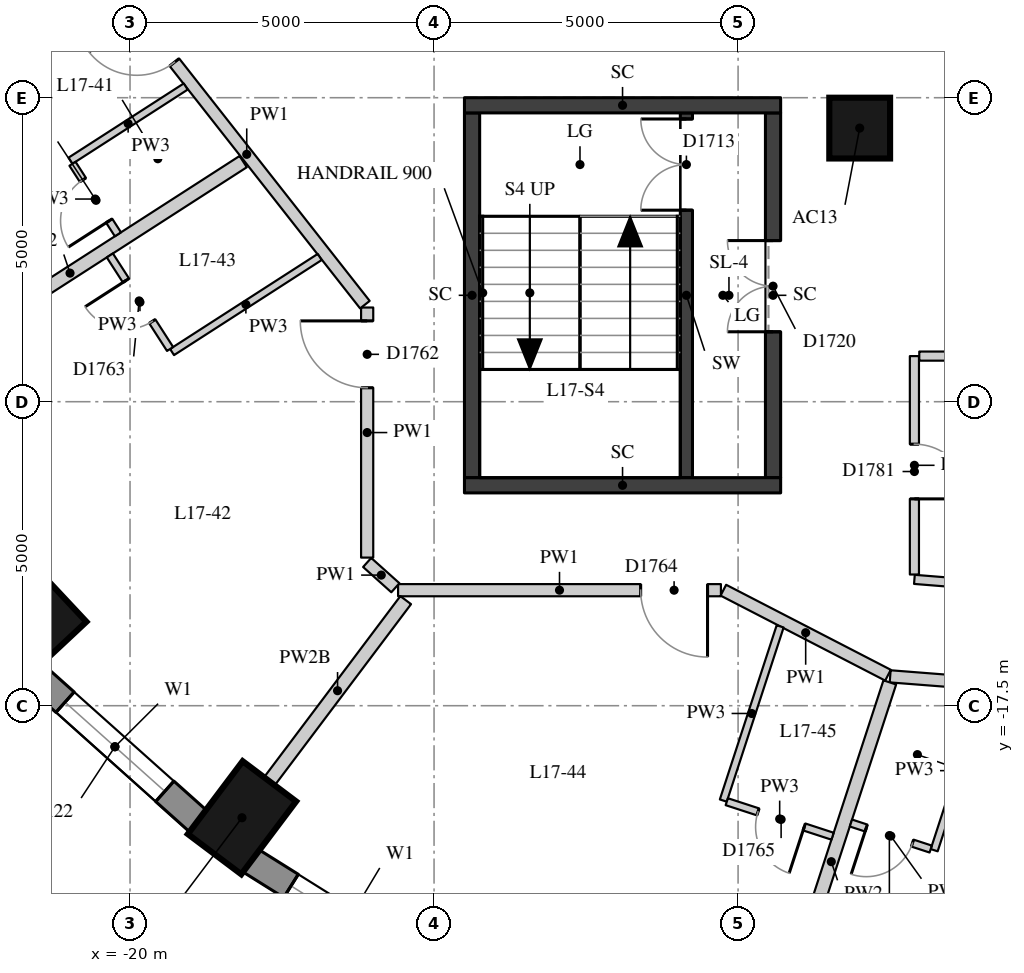
"""IFC4 building model, lengths in metres.
Left out: names, types, materials, properties, quantities, classifications, styles, units other than length and angle.
Written with IfcOpenShell. Run it as: python <this file> out.ifc"""

import sys

from ifc_helpers import new_model, si_unit, direction, frame, frame_2d, origin, origin_2d, place, context, subcontext, project, spatial, rectangle, extrude, element, fill, save


model = new_model("IFC4")
c1 = context("Model", 3, precision=1e-05, world=origin(), true_north=direction((0.0, 1.0)))
c2 = subcontext(c1, "Body", "Model", "MODEL_VIEW")
j1 = project(units=[si_unit("LENGTHUNIT", "METRE"), si_unit("PLANEANGLEUNIT", "RADIAN")], contexts=[c1])
p1 = place(None, origin())
s1 = spatial("IfcSite", under=j1, at=p1, CompositionType="ELEMENT")
p2 = place(p1, origin())
s2 = spatial("IfcBuilding", under=s1, at=p2, CompositionType="ELEMENT")
p3 = place(p2, frame((0.0, 0.0, 64.6)))
s3 = spatial("IfcBuildingStorey", under=s2, at=p3, CompositionType="ELEMENT", Elevation=64.6)
for number, where, z_axis, x_axis in (
    (1, (-21.641, -16.23, 0.0), (0.0, 0.0, 1.0), (-0.73, -0.683, 0.0)),
    (2, (-18.159, -19.343, 0.0), (0.0, 0.0, 1.0), (-0.601, -0.799, 0.0)),
):
    element("IfcColumn", number, at=place(p3, frame(where, z_axis=z_axis, x_axis=x_axis)), inside=s3, PredefinedType="COLUMN", context=c2, shape_type="SweptSolid", body=[
        extrude(rectangle(XDim=1.5, YDim=1.1, at=origin_2d()), origin(), (0.0, 0.0, 1.0), 3.3),
    ])
p4 = place(p3, frame((-8.0, -8.0, 0.0), z_axis=(0.0, 0.0, 1.0), x_axis=(1.0, 0.0, 0.0)))
e3 = element("IfcColumn", 3, at=p4, inside=s3, PredefinedType="COLUMN", context=c2, shape_type="SweptSolid", body=[
    extrude(rectangle(XDim=1.0, YDim=1.0, at=origin_2d()), origin(), (0.0, 0.0, 1.0), 3.3),
])
p5 = place(p3, frame((-21.627, -16.943, 0.0), z_axis=(0.0, 0.0, 1.0), x_axis=(0.745526233716, -0.66647628228, 0.0)))
e4 = element("IfcWall", 4, at=p5, inside=s3, PredefinedType="SOLIDWALL", context=c2, shape_type="SweptSolid", body=[
    extrude(rectangle(XDim=3.697, YDim=0.45, at=frame_2d((1.848, 0.0))), origin(), (0.0, 0.0, 1.0), 3.02),
])
p6 = place(p5, frame((0.749, 0.0, 0.4)))
e5 = element("IfcOpeningElement", 5, at=p6, cuts=e4, PredefinedType="OPENING", context=c2, shape_type="SweptSolid", body=[
    extrude(rectangle(XDim=2.2, YDim=1.75, at=frame_2d((1.1, 0.875))), frame((0.0, 0.235, 0.0), z_axis=(0.0, -1.0, 0.0), x_axis=(1.0, 0.0, 0.0)), (0.0, 0.0, 1.0), 0.47),
])
p7 = place(p3, frame((-18.023, -20.044, 0.0), z_axis=(0.0, 0.0, 1.0), x_axis=(0.847635480093, -0.530579016629, 0.0)))
e6 = element("IfcWall", 6, at=p7, inside=s3, PredefinedType="SOLIDWALL", context=c2, shape_type="SweptSolid", body=[
    extrude(rectangle(XDim=3.782, YDim=0.45, at=frame_2d((1.891, 0.0))), origin(), (0.0, 0.0, 1.0), 3.02),
])
p8 = place(p7, frame((0.791, 0.0, 0.4)))
e7 = element("IfcOpeningElement", 7, at=p8, cuts=e6, PredefinedType="OPENING", context=c2, shape_type="SweptSolid", body=[
    extrude(rectangle(XDim=2.2, YDim=1.75, at=frame_2d((1.1, 0.875))), frame((0.0, 0.235, 0.0), z_axis=(0.0, -1.0, 0.0), x_axis=(1.0, 0.0, 0.0)), (0.0, 0.0, 1.0), 0.47),
])
p9 = place(p3, frame((-10.85, -13.75, 0.0), z_axis=(0.0, 0.0, 1.0), x_axis=(0.0, 1.0, 0.0)))
e8 = element("IfcWall", 8, at=p9, inside=s3, PredefinedType="SHEAR", context=c2, shape_type="SweptSolid", body=[
    extrude(rectangle(XDim=6.0, YDim=0.2, at=frame_2d((3.0, 0.0))), origin(), (0.0, 0.0, 1.0), 3.02),
])
p10 = place(p9, frame((4.4, 0.0, 0.0)))
e9 = element("IfcOpeningElement", 9, at=p10, cuts=e8, PredefinedType="OPENING", context=c2, shape_type="SweptSolid", body=[
    extrude(rectangle(XDim=1.5, YDim=2.1, at=frame_2d((0.75, 1.05))), frame((0.0, 0.11, 0.0), z_axis=(0.0, -1.0, 0.0), x_axis=(1.0, 0.0, 0.0)), (0.0, 0.0, 1.0), 0.22),
])
p11 = place(p3, frame((-14.375, -13.75, -0.28), z_axis=(0.0, 0.0, 1.0), x_axis=(0.0, 1.0, 0.0)))
e10 = element("IfcWall", 10, at=p11, inside=s3, PredefinedType="SHEAR", context=c2, shape_type="SweptSolid", body=[
    extrude(rectangle(XDim=6.0, YDim=0.25, at=frame_2d((3.0, 0.0))), origin(), (0.0, 0.0, 1.0), 3.3),
])
p12 = place(p3, frame((-9.425, -13.75, -0.28), z_axis=(0.0, 0.0, 1.0), x_axis=(0.0, 1.0, 0.0)))
e11 = element("IfcWall", 11, at=p12, inside=s3, PredefinedType="SHEAR", context=c2, shape_type="SweptSolid", body=[
    extrude(rectangle(XDim=6.0, YDim=0.25, at=frame_2d((3.0, 0.0))), origin(), (0.0, 0.0, 1.0), 3.3),
])
p13 = place(p12, frame((2.4, 0.0, 0.28)))
e12 = element("IfcOpeningElement", 12, at=p13, cuts=e11, PredefinedType="OPENING", context=c2, shape_type="SweptSolid", body=[
    extrude(rectangle(XDim=1.5, YDim=2.1, at=frame_2d((0.75, 1.05))), frame((0.0, 0.135, 0.0), z_axis=(0.0, -1.0, 0.0), x_axis=(1.0, 0.0, 0.0)), (0.0, 0.0, 1.0), 0.27),
])
for number, where, z_axis, x_axis in (
    (13, (-14.5, -7.625, -0.28), (0.0, 0.0, 1.0), (1.0, 0.0, 0.0)),
    (14, (-14.5, -13.875, -0.28), (0.0, 0.0, 1.0), (1.0, 0.0, 0.0)),
):
    element("IfcWall", number, at=place(p3, frame(where, z_axis=z_axis, x_axis=x_axis)), inside=s3, PredefinedType="SHEAR", context=c2, shape_type="SweptSolid", body=[
        extrude(rectangle(XDim=5.2, YDim=0.25, at=frame_2d((2.6, 0.0))), origin(), (0.0, 0.0, 1.0), 3.3),
    ])
p14 = place(p3, frame((3.778, -17.898, 0.0), z_axis=(0.0, 0.0, 1.0), x_axis=(-0.996963005503, 0.077876605336, 0.0)))
e15 = element("IfcWall", 15, at=p14, inside=s3, PredefinedType="PARTITIONING", context=c2, shape_type="SweptSolid", body=[
    extrude(rectangle(XDim=11.311, YDim=0.2, at=frame_2d((5.656, 0.0))), origin(), (0.0, 0.0, 1.0), 3.02),
])
p15 = place(p14, frame((8.33, 0.0, 0.0)))
e16 = element("IfcOpeningElement", 16, at=p15, cuts=e15, PredefinedType="OPENING", context=c2, shape_type="SweptSolid", body=[
    extrude(rectangle(XDim=1.0, YDim=2.1, at=frame_2d((0.5, 1.05))), frame((0.0, 0.11, 0.0), z_axis=(0.0, -1.0, 0.0), x_axis=(1.0, 0.0, 0.0)), (0.0, 0.0, 1.0), 0.22),
])
p16 = place(p14, frame((5.77, 0.0, 0.0)))
e17 = element("IfcOpeningElement", 17, at=p16, cuts=e15, PredefinedType="OPENING", context=c2, shape_type="SweptSolid", body=[
    extrude(rectangle(XDim=1.0, YDim=2.1, at=frame_2d((0.5, 1.05))), frame((0.0, 0.11, 0.0), z_axis=(0.0, -1.0, 0.0), x_axis=(1.0, 0.0, 0.0)), (0.0, 0.0, 1.0), 0.22),
])
p17 = place(p14, frame((1.45, 0.0, 0.0)))
e18 = element("IfcOpeningElement", 18, at=p17, cuts=e15, PredefinedType="OPENING", context=c2, shape_type="SweptSolid", body=[
    extrude(rectangle(XDim=0.9, YDim=2.1, at=frame_2d((0.45, 1.05))), frame((0.0, 0.11, 0.0), z_axis=(0.0, -1.0, 0.0), x_axis=(1.0, 0.0, 0.0)), (0.0, 0.0, 1.0), 0.22),
])
p18 = place(p3, frame((-7.534, -16.998, 0.0), z_axis=(0.0, 0.0, 1.0), x_axis=(-0.888535328052, 0.458808206992, 0.0)))
e19 = element("IfcWall", 19, at=p18, inside=s3, PredefinedType="PARTITIONING", context=c2, shape_type="SweptSolid", body=[
    extrude(rectangle(XDim=3.047, YDim=0.2, at=frame_2d((1.524, 0.0))), origin(), (0.0, 0.0, 1.0), 3.02),
])
p19 = place(p3, frame((-10.282, -15.6, 0.0), z_axis=(0.0, 0.0, 1.0), x_axis=(-1.0, 0.0, 0.0)))
e20 = element("IfcWall", 20, at=p19, inside=s3, PredefinedType="PARTITIONING", context=c2, shape_type="SweptSolid", body=[
    extrude(rectangle(XDim=5.309, YDim=0.2, at=frame_2d((2.655, 0.0))), origin(), (0.0, 0.0, 1.0), 3.02),
])
p20 = place(p19, frame((0.22, 0.0, 0.0)))
e21 = element("IfcOpeningElement", 21, at=p20, cuts=e20, PredefinedType="OPENING", context=c2, shape_type="SweptSolid", body=[
    extrude(rectangle(XDim=1.1, YDim=2.1, at=frame_2d((0.55, 1.05))), frame((0.0, 0.11, 0.0), z_axis=(0.0, -1.0, 0.0), x_axis=(1.0, 0.0, 0.0)), (0.0, 0.0, 1.0), 0.22),
])
p21 = place(p3, frame((-15.636, -15.56, 0.0), z_axis=(0.0, 0.0, 1.0), x_axis=(-0.744656758283, 0.667447610187, 0.0)))
e22 = element("IfcWall", 22, at=p21, inside=s3, PredefinedType="PARTITIONING", context=c2, shape_type="SweptSolid", body=[
    extrude(rectangle(XDim=0.623, YDim=0.2, at=frame_2d((0.312, 0.0))), origin(), (0.0, 0.0, 1.0), 3.02),
])
p22 = place(p3, frame((-16.1, -15.064, 0.0), z_axis=(0.0, 0.0, 1.0), x_axis=(0.0, 1.0, 0.0)))
e23 = element("IfcWall", 23, at=p22, inside=s3, PredefinedType="PARTITIONING", context=c2, shape_type="SweptSolid", body=[
    extrude(rectangle(XDim=4.113, YDim=0.2, at=frame_2d((2.057, 0.0))), origin(), (0.0, 0.0, 1.0), 3.02),
])
p23 = place(p22, frame((2.793, 0.0, 0.0)))
e24 = element("IfcOpeningElement", 24, at=p23, cuts=e23, PredefinedType="OPENING", context=c2, shape_type="SweptSolid", body=[
    extrude(rectangle(XDim=1.1, YDim=2.1, at=frame_2d((0.55, 1.05))), frame((0.0, 0.11, 0.0), z_axis=(0.0, -1.0, 0.0), x_axis=(1.0, 0.0, 0.0)), (0.0, 0.0, 1.0), 0.22),
])
p24 = place(p3, frame((-16.137, -10.904, 0.0), z_axis=(0.0, 0.0, 1.0), x_axis=(-0.617888403737, 0.786265807808, 0.0)))
e25 = element("IfcWall", 25, at=p24, inside=s3, PredefinedType="PARTITIONING", context=c2, shape_type="SweptSolid", body=[
    extrude(rectangle(XDim=6.29, YDim=0.2, at=frame_2d((3.145, 0.0))), origin(), (0.0, 0.0, 1.0), 3.02),
])
p25 = place(p24, frame((5.07, 0.0, 0.0)))
e26 = element("IfcOpeningElement", 26, at=p25, cuts=e25, PredefinedType="OPENING", context=c2, shape_type="SweptSolid", body=[
    extrude(rectangle(XDim=1.0, YDim=2.1, at=frame_2d((0.5, 1.05))), frame((0.0, 0.11, 0.0), z_axis=(0.0, -1.0, 0.0), x_axis=(1.0, 0.0, 0.0)), (0.0, 0.0, 1.0), 0.22),
])
p26 = place(p3, frame((1.32, -16.1, 0.0), z_axis=(0.0, 0.0, 1.0), x_axis=(-0.996773882711, 0.080260991426, 0.0)))
e27 = element("IfcWall", 27, at=p26, inside=s3, PredefinedType="PARTITIONING", context=c2, shape_type="SweptSolid", body=[
    extrude(rectangle(XDim=8.447, YDim=0.15, at=frame_2d((4.224, 0.0))), origin(), (0.0, 0.0, 1.0), 3.02),
])
p27 = place(p3, frame((-7.1, -15.342, 0.0), z_axis=(0.0, 0.0, 1.0), x_axis=(0.0, 1.0, 0.0)))
e28 = element("IfcWall", 28, at=p27, inside=s3, PredefinedType="PARTITIONING", context=c2, shape_type="SweptSolid", body=[
    extrude(rectangle(XDim=3.592, YDim=0.15, at=frame_2d((1.796, 0.0))), origin(), (0.0, 0.0, 1.0), 3.02),
])
p28 = place(p27, frame((1.244, 0.0, 0.0)))
e29 = element("IfcOpeningElement", 29, at=p28, cuts=e28, PredefinedType="OPENING", context=c2, shape_type="SweptSolid", body=[
    extrude(rectangle(XDim=0.9, YDim=2.1, at=frame_2d((0.45, 1.05))), frame((0.0, 0.085, 0.0), z_axis=(0.0, -1.0, 0.0), x_axis=(1.0, 0.0, 0.0)), (0.0, 0.0, 1.0), 0.17),
])
p29 = place(p3, frame((-7.02, -11.75, 0.0), z_axis=(0.0, 0.0, 1.0), x_axis=(1.0, 0.0, 0.0)))
e30 = element("IfcWall", 30, at=p29, inside=s3, PredefinedType="PARTITIONING", context=c2, shape_type="SweptSolid", body=[
    extrude(rectangle(XDim=2.52, YDim=0.15, at=frame_2d((1.26, 0.0))), origin(), (0.0, 0.0, 1.0), 3.02),
])
p30 = place(p3, frame((-24.608, -7.82, 0.0), z_axis=(0.0, 0.0, 1.0), x_axis=(0.92655764882, 0.376152792643, 0.0)))
e31 = element("IfcWall", 31, at=p30, inside=s3, PredefinedType="PARTITIONING", context=c2, shape_type="SweptSolid", body=[
    extrude(rectangle(XDim=4.848, YDim=0.22, at=frame_2d((2.424, 0.0))), origin(), (0.0, 0.0, 1.0), 3.02),
])
p31 = place(p3, frame((-23.835, -12.219, 0.0), z_axis=(0.0, 0.0, 1.0), x_axis=(0.840749666863, 0.541424046076, 0.0)))
e32 = element("IfcWall", 32, at=p31, inside=s3, PredefinedType="PARTITIONING", context=c2, shape_type="SweptSolid", body=[
    extrude(rectangle(XDim=6.775, YDim=0.22, at=frame_2d((3.387, 0.0))), origin(), (0.0, 0.0, 1.0), 3.02),
])
p32 = place(p3, frame((-17.708, -18.743, 0.0), z_axis=(0.0, 0.0, 1.0), x_axis=(0.601172757903, 0.799119086967, 0.0)))
e33 = element("IfcWall", 33, at=p32, inside=s3, PredefinedType="PARTITIONING", context=c2, shape_type="SweptSolid", body=[
    extrude(rectangle(XDim=3.729, YDim=0.22, at=frame_2d((1.864, 0.0))), origin(), (0.0, 0.0, 1.0), 2.57),
])
p33 = place(p3, frame((-9.429, -23.014, 0.0), z_axis=(0.0, 0.0, 1.0), x_axis=(0.310235573501, 0.950659712481, 0.0)))
e34 = element("IfcWall", 34, at=p33, inside=s3, PredefinedType="PARTITIONING", context=c2, shape_type="SweptSolid", body=[
    extrude(rectangle(XDim=6.204, YDim=0.22, at=frame_2d((3.102, 0.0))), origin(), (0.0, 0.0, 1.0), 3.02),
])
p34 = place(p3, frame((-19.084, -7.316, 0.0), z_axis=(0.0, 0.0, 1.0), x_axis=(-0.840762836723, -0.54140359473, 0.0)))
e35 = element("IfcWall", 35, at=p34, inside=s3, PredefinedType="PARTITIONING", context=c2, shape_type="SweptSolid", body=[
    extrude(rectangle(XDim=2.253, YDim=0.12, at=frame_2d((1.127, 0.0))), origin(), (0.0, 0.0, 1.0), 3.02),
])
p35 = place(p3, frame((-16.881, -10.12, 0.0), z_axis=(0.0, 0.0, 1.0), x_axis=(-0.840749755927, -0.541423907773, 0.0)))
e36 = element("IfcWall", 36, at=p35, inside=s3, PredefinedType="PARTITIONING", context=c2, shape_type="SweptSolid", body=[
    extrude(rectangle(XDim=2.888, YDim=0.12, at=frame_2d((1.444, 0.0))), origin(), (0.0, 0.0, 1.0), 3.02),
])
p36 = place(p3, frame((-9.308, -16.195, 0.0), z_axis=(0.0, 0.0, 1.0), x_axis=(-0.310170219214, -0.950681037527, 0.0)))
e37 = element("IfcWall", 37, at=p36, inside=s3, PredefinedType="PARTITIONING", context=c2, shape_type="SweptSolid", body=[
    extrude(rectangle(XDim=3.014, YDim=0.12, at=frame_2d((1.507, 0.0))), origin(), (0.0, 0.0, 1.0), 3.02),
])
p37 = place(p3, frame((-5.921, -17.26, 0.0), z_axis=(0.0, 0.0, 1.0), x_axis=(-0.310180943487, -0.950677538547, 0.0)))
e38 = element("IfcWall", 38, at=p37, inside=s3, PredefinedType="PARTITIONING", context=c2, shape_type="SweptSolid", body=[
    extrude(rectangle(XDim=2.752, YDim=0.12, at=frame_2d((1.376, 0.0))), origin(), (0.0, 0.0, 1.0), 3.02),
])
p38 = place(p3, frame((-20.946, -8.587, 0.0), z_axis=(0.0, 0.0, 1.0), x_axis=(0.541526323973, -0.840683793375, 0.0)))
e39 = element("IfcWall", 39, at=p38, inside=s3, PredefinedType="PARTITIONING", context=c2, shape_type="SweptSolid", body=[
    extrude(rectangle(XDim=1.38, YDim=0.12, at=frame_2d((0.69, 0.0))), origin(), (0.0, 0.0, 1.0), 3.02),
])
p39 = place(p38, frame((0.315, 0.0, 0.0)))
e40 = element("IfcOpeningElement", 40, at=p39, cuts=e39, PredefinedType="OPENING", context=c2, shape_type="SweptSolid", body=[
    extrude(rectangle(XDim=0.8, YDim=2.1, at=frame_2d((0.4, 1.05))), frame((0.0, 0.07, 0.0), z_axis=(0.0, -1.0, 0.0), x_axis=(1.0, 0.0, 0.0)), (0.0, 0.0, 1.0), 0.14),
])
p40 = place(p3, frame((-19.341, -11.633, 0.0), z_axis=(0.0, 0.0, 1.0), x_axis=(-0.541391271501, 0.840770772055, 0.0)))
e41 = element("IfcWall", 41, at=p40, inside=s3, PredefinedType="PARTITIONING", context=c2, shape_type="SweptSolid", body=[
    extrude(rectangle(XDim=1.83, YDim=0.12, at=frame_2d((0.915, 0.0))), origin(), (0.0, 0.0, 1.0), 3.02),
])
p41 = place(p40, frame((0.54, 0.0, 0.0)))
e42 = element("IfcOpeningElement", 42, at=p41, cuts=e41, PredefinedType="OPENING", context=c2, shape_type="SweptSolid", body=[
    extrude(rectangle(XDim=0.8, YDim=2.1, at=frame_2d((0.4, 1.05))), frame((0.0, 0.07, 0.0), z_axis=(0.0, -1.0, 0.0), x_axis=(1.0, 0.0, 0.0)), (0.0, 0.0, 1.0), 0.14),
])
p42 = place(p3, frame((-10.186, -19.079, 0.0), z_axis=(0.0, 0.0, 1.0), x_axis=(0.950678536911, -0.31017788357, 0.0)))
e43 = element("IfcWall", 43, at=p42, inside=s3, PredefinedType="PARTITIONING", context=c2, shape_type="SweptSolid", body=[
    extrude(rectangle(XDim=1.83, YDim=0.12, at=frame_2d((0.915, 0.0))), origin(), (0.0, 0.0, 1.0), 3.02),
])
p43 = place(p42, frame((0.54, 0.0, 0.0)))
e44 = element("IfcOpeningElement", 44, at=p43, cuts=e43, PredefinedType="OPENING", context=c2, shape_type="SweptSolid", body=[
    extrude(rectangle(XDim=0.8, YDim=2.1, at=frame_2d((0.4, 1.05))), frame((0.0, 0.07, 0.0), z_axis=(0.0, -1.0, 0.0), x_axis=(1.0, 0.0, 0.0)), (0.0, 0.0, 1.0), 0.14),
])
p44 = place(p3, frame((-6.832, -19.858, 0.0), z_axis=(0.0, 0.0, 1.0), x_axis=(-0.950645927723, 0.31027781117, 0.0)))
e45 = element("IfcWall", 45, at=p44, inside=s3, PredefinedType="PARTITIONING", context=c2, shape_type="SweptSolid", body=[
    extrude(rectangle(XDim=1.38, YDim=0.12, at=frame_2d((0.69, 0.0))), origin(), (0.0, 0.0, 1.0), 3.02),
])
p45 = place(p44, frame((0.315, 0.0, 0.0)))
e46 = element("IfcOpeningElement", 46, at=p45, cuts=e45, PredefinedType="OPENING", context=c2, shape_type="SweptSolid", body=[
    extrude(rectangle(XDim=0.8, YDim=2.1, at=frame_2d((0.4, 1.05))), frame((0.0, 0.07, 0.0), z_axis=(0.0, -1.0, 0.0), x_axis=(1.0, 0.0, 0.0)), (0.0, 0.0, 1.0), 0.14),
])
p46 = place(p6, origin())
e47 = element("IfcWindow", 47, at=p46, inside=s3, PartitioningType="SINGLE_PANEL", PredefinedType="WINDOW", context=c2, shape_type="SweptSolid", body=[
    extrude(rectangle(XDim=2.2, YDim=1.75, at=frame_2d((1.1, 0.875))), frame((0.0, 0.035, 0.0), z_axis=(0.0, -1.0, 0.0), x_axis=(1.0, 0.0, 0.0)), (0.0, 0.0, 1.0), 0.06),
])
fill(e5, e47)
p47 = place(p8, origin())
e48 = element("IfcWindow", 48, at=p47, inside=s3, PartitioningType="SINGLE_PANEL", PredefinedType="WINDOW", context=c2, shape_type="SweptSolid", body=[
    extrude(rectangle(XDim=2.2, YDim=1.75, at=frame_2d((1.1, 0.875))), frame((0.0, 0.035, 0.0), z_axis=(0.0, -1.0, 0.0), x_axis=(1.0, 0.0, 0.0)), (0.0, 0.0, 1.0), 0.06),
])
fill(e7, e48)
p48 = place(p10, origin())
e49 = element("IfcDoor", 49, at=p48, inside=s3, OperationType="DOUBLE_DOOR_SINGLE_SWING", PredefinedType="DOOR", context=c2, shape_type="SweptSolid", body=[
    extrude(rectangle(XDim=1.5, YDim=2.1, at=frame_2d((0.75, 1.05))), frame((0.0, 0.025, 0.0), z_axis=(0.0, -1.0, 0.0), x_axis=(1.0, 0.0, 0.0)), (0.0, 0.0, 1.0), 0.05),
])
fill(e9, e49)
p49 = place(p13, origin())
e50 = element("IfcDoor", 50, at=p49, inside=s3, OperationType="DOUBLE_DOOR_SINGLE_SWING", PredefinedType="DOOR", context=c2, shape_type="SweptSolid", body=[
    extrude(rectangle(XDim=1.5, YDim=2.1, at=frame_2d((0.75, 1.05))), frame((0.0, 0.025, 0.0), z_axis=(0.0, -1.0, 0.0), x_axis=(1.0, 0.0, 0.0)), (0.0, 0.0, 1.0), 0.05),
])
fill(e12, e50)
p50 = place(p25, origin())
e51 = element("IfcDoor", 51, at=p50, inside=s3, OperationType="SINGLE_SWING_RIGHT", PredefinedType="DOOR", context=c2, shape_type="SweptSolid", body=[
    extrude(rectangle(XDim=1.0, YDim=2.1, at=frame_2d((0.5, 1.05))), frame((0.0, 0.025, 0.0), z_axis=(0.0, -1.0, 0.0), x_axis=(1.0, 0.0, 0.0)), (0.0, 0.0, 1.0), 0.05),
])
fill(e26, e51)
p51 = place(p39, origin())
e52 = element("IfcDoor", 52, at=p51, inside=s3, OperationType="SINGLE_SWING_LEFT", PredefinedType="DOOR", context=c2, shape_type="SweptSolid", body=[
    extrude(rectangle(XDim=0.8, YDim=2.1, at=frame_2d((0.4, 1.05))), frame((0.0, 0.025, 0.0), z_axis=(0.0, -1.0, 0.0), x_axis=(1.0, 0.0, 0.0)), (0.0, 0.0, 1.0), 0.05),
])
fill(e40, e52)
p52 = place(p23, origin())
e53 = element("IfcDoor", 53, at=p52, inside=s3, OperationType="SINGLE_SWING_RIGHT", PredefinedType="DOOR", context=c2, shape_type="SweptSolid", body=[
    extrude(rectangle(XDim=1.1, YDim=2.1, at=frame_2d((0.55, 1.05))), frame((0.0, 0.025, 0.0), z_axis=(0.0, -1.0, 0.0), x_axis=(1.0, 0.0, 0.0)), (0.0, 0.0, 1.0), 0.05),
])
fill(e24, e53)
p53 = place(p41, origin())
e54 = element("IfcDoor", 54, at=p53, inside=s3, OperationType="SINGLE_SWING_RIGHT", PredefinedType="DOOR", context=c2, shape_type="SweptSolid", body=[
    extrude(rectangle(XDim=0.8, YDim=2.1, at=frame_2d((0.4, 1.05))), frame((0.0, 0.025, 0.0), z_axis=(0.0, -1.0, 0.0), x_axis=(1.0, 0.0, 0.0)), (0.0, 0.0, 1.0), 0.05),
])
fill(e42, e54)
p54 = place(p20, origin())
e55 = element("IfcDoor", 55, at=p54, inside=s3, OperationType="SINGLE_SWING_LEFT", PredefinedType="DOOR", context=c2, shape_type="SweptSolid", body=[
    extrude(rectangle(XDim=1.1, YDim=2.1, at=frame_2d((0.55, 1.05))), frame((0.0, 0.025, 0.0), z_axis=(0.0, -1.0, 0.0), x_axis=(1.0, 0.0, 0.0)), (0.0, 0.0, 1.0), 0.05),
])
fill(e21, e55)
p55 = place(p43, origin())
e56 = element("IfcDoor", 56, at=p55, inside=s3, OperationType="SINGLE_SWING_LEFT", PredefinedType="DOOR", context=c2, shape_type="SweptSolid", body=[
    extrude(rectangle(XDim=0.8, YDim=2.1, at=frame_2d((0.4, 1.05))), frame((0.0, 0.025, 0.0), z_axis=(0.0, -1.0, 0.0), x_axis=(1.0, 0.0, 0.0)), (0.0, 0.0, 1.0), 0.05),
])
fill(e44, e56)
p56 = place(p45, origin())
e57 = element("IfcDoor", 57, at=p56, inside=s3, OperationType="SINGLE_SWING_RIGHT", PredefinedType="DOOR", context=c2, shape_type="SweptSolid", body=[
    extrude(rectangle(XDim=0.8, YDim=2.1, at=frame_2d((0.4, 1.05))), frame((0.0, 0.025, 0.0), z_axis=(0.0, -1.0, 0.0), x_axis=(1.0, 0.0, 0.0)), (0.0, 0.0, 1.0), 0.05),
])
fill(e46, e57)
p57 = place(p28, origin())
e58 = element("IfcDoor", 58, at=p57, inside=s3, OperationType="SINGLE_SWING_RIGHT", PredefinedType="DOOR", context=c2, shape_type="SweptSolid", body=[
    extrude(rectangle(XDim=0.9, YDim=2.1, at=frame_2d((0.45, 1.05))), frame((0.0, 0.025, 0.0), z_axis=(0.0, -1.0, 0.0), x_axis=(1.0, 0.0, 0.0)), (0.0, 0.0, 1.0), 0.05),
])
fill(e29, e58)
save(model, sys.argv[1])
